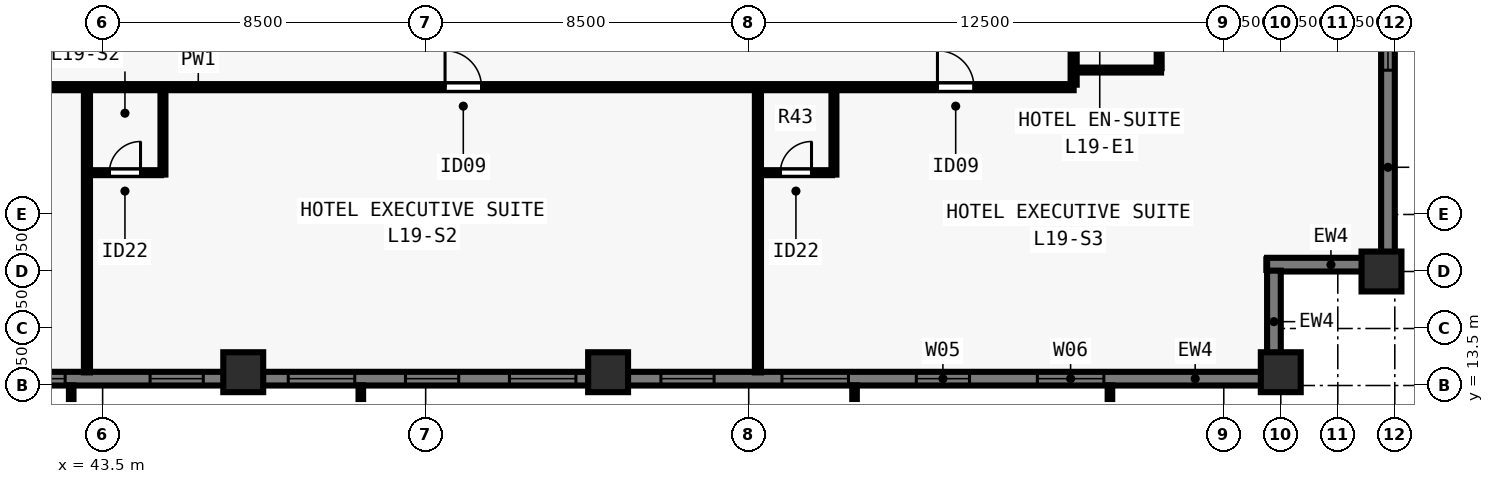
"""IFC4 building model, lengths in metres.
Left out: names, types, materials, properties, quantities, classifications, styles, units other than length and angle.
Written with IfcOpenShell. Run it as: python <this file> out.ifc"""

import sys

from ifc_helpers import new_model, si_unit, direction, frame, frame_2d, origin, origin_2d, place, context, subcontext, project, spatial, rectangle, extrude, element, fill, save


model = new_model("IFC4")
c1 = context("Model", 3, precision=1e-05, world=origin(), true_north=direction((0.0, 1.0)))
c2 = subcontext(c1, "Body", "Model", "MODEL_VIEW")
j1 = project(units=[si_unit("LENGTHUNIT", "METRE"), si_unit("PLANEANGLEUNIT", "RADIAN")], contexts=[c1])
p1 = place(None, origin())
s1 = spatial("IfcSite", under=j1, at=p1, CompositionType="ELEMENT")
p2 = place(p1, origin())
s2 = spatial("IfcBuilding", under=s1, at=p2, CompositionType="ELEMENT")
p3 = place(p2, frame((0.0, 0.0, 72.5)))
s3 = spatial("IfcBuildingStorey", under=s2, at=p3, CompositionType="ELEMENT", Elevation=72.5)
for number, where, z_axis, x_axis in (
    (1, (47.2, 13.85, 0.0), (0.0, 0.0, 1.0), (1.0, 0.0, 0.0)),
    (2, (56.8, 13.85, 0.0), (0.0, 0.0, 1.0), (1.0, 0.0, 0.0)),
    (3, (74.5, 13.85, 0.0), (0.0, 0.0, 1.0), (1.0, 0.0, 0.0)),
    (4, (77.15, 16.5, 0.0), (0.0, 0.0, 1.0), (0.0, 1.0, 0.0)),
):
    element("IfcColumn", number, at=place(p3, frame(where, z_axis=z_axis, x_axis=x_axis)), inside=s3, PredefinedType="COLUMN", context=c2, shape_type="SweptSolid", body=[
        extrude(rectangle(XDim=1.05, YDim=1.05, at=origin_2d()), origin(), (0.0, 0.0, 1.0), 3.5),
    ])
p4 = place(p3, frame((77.32, 36.4, 0.0), z_axis=(0.0, 0.0, 1.0), x_axis=(0.0, -1.0, 0.0)))
e5 = element("IfcWall", 5, at=p4, inside=s3, PredefinedType="SOLIDWALL", context=c2, shape_type="SweptSolid", body=[
    extrude(rectangle(XDim=19.562, YDim=0.36, at=frame_2d((9.781, 0.0))), origin(), (0.0, 0.0, 1.0), 3.28),
])
p5 = place(p4, frame((3.033, 0.0, 0.8)))
e6 = element("IfcOpeningElement", 6, at=p5, cuts=e5, PredefinedType="OPENING", context=c2, shape_type="SweptSolid", body=[
    extrude(rectangle(XDim=1.75, YDim=1.544, at=frame_2d((0.875, 0.772))), frame((0.0, 0.19, 0.0), z_axis=(0.0, -1.0, 0.0), x_axis=(1.0, 0.0, 0.0)), (0.0, 0.0, 1.0), 0.38),
])
p6 = place(p4, frame((5.973, 0.0, 0.8)))
e7 = element("IfcOpeningElement", 7, at=p6, cuts=e5, PredefinedType="OPENING", context=c2, shape_type="SweptSolid", body=[
    extrude(rectangle(XDim=1.4, YDim=1.544, at=frame_2d((0.7, 0.772))), frame((0.0, 0.19, 0.0), z_axis=(0.0, -1.0, 0.0), x_axis=(1.0, 0.0, 0.0)), (0.0, 0.0, 1.0), 0.38),
])
p7 = place(p4, frame((9.414, 0.0, 0.8)))
e8 = element("IfcOpeningElement", 8, at=p7, cuts=e5, PredefinedType="OPENING", context=c2, shape_type="SweptSolid", body=[
    extrude(rectangle(XDim=1.75, YDim=1.544, at=frame_2d((0.875, 0.772))), frame((0.0, 0.19, 0.0), z_axis=(0.0, -1.0, 0.0), x_axis=(1.0, 0.0, 0.0)), (0.0, 0.0, 1.0), 0.38),
])
p8 = place(p4, frame((13.204, 0.0, 0.8)))
e9 = element("IfcOpeningElement", 9, at=p8, cuts=e5, PredefinedType="OPENING", context=c2, shape_type="SweptSolid", body=[
    extrude(rectangle(XDim=1.4, YDim=1.544, at=frame_2d((0.7, 0.772))), frame((0.0, 0.19, 0.0), z_axis=(0.0, -1.0, 0.0), x_axis=(1.0, 0.0, 0.0)), (0.0, 0.0, 1.0), 0.38),
])
p9 = place(p3, frame((77.5, 16.68, 0.0), z_axis=(0.0, 0.0, 1.0), x_axis=(-1.0, 0.0, 0.0)))
e10 = element("IfcWall", 10, at=p9, inside=s3, PredefinedType="SOLIDWALL", context=c2, shape_type="SweptSolid", body=[
    extrude(rectangle(XDim=3.36, YDim=0.36, at=frame_2d((1.68, 0.0))), origin(), (0.0, 0.0, 1.0), 3.28),
])
p10 = place(p3, frame((74.32, 16.522, 0.0), z_axis=(0.0, 0.0, 1.0), x_axis=(0.0, -1.0, 0.0)))
e11 = element("IfcWall", 11, at=p10, inside=s3, PredefinedType="SOLIDWALL", context=c2, shape_type="SweptSolid", body=[
    extrude(rectangle(XDim=2.684, YDim=0.36, at=frame_2d((1.342, 0.0))), origin(), (0.0, 0.0, 1.0), 3.28),
])
p11 = place(p3, frame((74.5, 13.68, 0.0), z_axis=(0.0, 0.0, 1.0), x_axis=(-1.0, 0.0, 0.0)))
e12 = element("IfcWall", 12, at=p11, inside=s3, PredefinedType="SOLIDWALL", context=c2, shape_type="SweptSolid", body=[
    extrude(rectangle(XDim=44.662, YDim=0.36, at=frame_2d((22.331, 0.0))), origin(), (0.0, 0.0, 1.0), 3.28),
])
p12 = place(p11, frame((4.655, 0.0, 0.8)))
e13 = element("IfcOpeningElement", 13, at=p12, cuts=e12, PredefinedType="OPENING", context=c2, shape_type="SweptSolid", body=[
    extrude(rectangle(XDim=1.75, YDim=1.544, at=frame_2d((0.875, 0.772))), frame((0.0, 0.19, 0.0), z_axis=(0.0, -1.0, 0.0), x_axis=(1.0, 0.0, 0.0)), (0.0, 0.0, 1.0), 0.38),
])
p13 = place(p11, frame((8.19, 0.0, 0.8)))
e14 = element("IfcOpeningElement", 14, at=p13, cuts=e12, PredefinedType="OPENING", context=c2, shape_type="SweptSolid", body=[
    extrude(rectangle(XDim=1.4, YDim=1.544, at=frame_2d((0.7, 0.772))), frame((0.0, 0.19, 0.0), z_axis=(0.0, -1.0, 0.0), x_axis=(1.0, 0.0, 0.0)), (0.0, 0.0, 1.0), 0.38),
])
p14 = place(p11, frame((11.375, 0.0, 0.8)))
e15 = element("IfcOpeningElement", 15, at=p14, cuts=e12, PredefinedType="OPENING", context=c2, shape_type="SweptSolid", body=[
    extrude(rectangle(XDim=1.75, YDim=1.544, at=frame_2d((0.875, 0.772))), frame((0.0, 0.19, 0.0), z_axis=(0.0, -1.0, 0.0), x_axis=(1.0, 0.0, 0.0)), (0.0, 0.0, 1.0), 0.38),
])
p15 = place(p11, frame((14.911, 0.0, 0.8)))
e16 = element("IfcOpeningElement", 16, at=p15, cuts=e12, PredefinedType="OPENING", context=c2, shape_type="SweptSolid", body=[
    extrude(rectangle(XDim=1.4, YDim=1.544, at=frame_2d((0.7, 0.772))), frame((0.0, 0.19, 0.0), z_axis=(0.0, -1.0, 0.0), x_axis=(1.0, 0.0, 0.0)), (0.0, 0.0, 1.0), 0.38),
])
p16 = place(p11, frame((18.546, 0.0, 0.8)))
e17 = element("IfcOpeningElement", 17, at=p16, cuts=e12, PredefinedType="OPENING", context=c2, shape_type="SweptSolid", body=[
    extrude(rectangle(XDim=1.75, YDim=1.544, at=frame_2d((0.875, 0.772))), frame((0.0, 0.19, 0.0), z_axis=(0.0, -1.0, 0.0), x_axis=(1.0, 0.0, 0.0)), (0.0, 0.0, 1.0), 0.38),
])
p17 = place(p11, frame((21.631, 0.0, 0.8)))
e18 = element("IfcOpeningElement", 18, at=p17, cuts=e12, PredefinedType="OPENING", context=c2, shape_type="SweptSolid", body=[
    extrude(rectangle(XDim=1.4, YDim=1.544, at=frame_2d((0.7, 0.772))), frame((0.0, 0.19, 0.0), z_axis=(0.0, -1.0, 0.0), x_axis=(1.0, 0.0, 0.0)), (0.0, 0.0, 1.0), 0.38),
])
p18 = place(p11, frame((24.366, 0.0, 0.8)))
e19 = element("IfcOpeningElement", 19, at=p18, cuts=e12, PredefinedType="OPENING", context=c2, shape_type="SweptSolid", body=[
    extrude(rectangle(XDim=1.75, YDim=1.544, at=frame_2d((0.875, 0.772))), frame((0.0, 0.19, 0.0), z_axis=(0.0, -1.0, 0.0), x_axis=(1.0, 0.0, 0.0)), (0.0, 0.0, 1.0), 0.38),
])
p19 = place(p11, frame((28.351, 0.0, 0.8)))
e20 = element("IfcOpeningElement", 20, at=p19, cuts=e12, PredefinedType="OPENING", context=c2, shape_type="SweptSolid", body=[
    extrude(rectangle(XDim=1.4, YDim=1.544, at=frame_2d((0.7, 0.772))), frame((0.0, 0.19, 0.0), z_axis=(0.0, -1.0, 0.0), x_axis=(1.0, 0.0, 0.0)), (0.0, 0.0, 1.0), 0.38),
])
p20 = place(p11, frame((31.987, 0.0, 0.8)))
e21 = element("IfcOpeningElement", 21, at=p20, cuts=e12, PredefinedType="OPENING", context=c2, shape_type="SweptSolid", body=[
    extrude(rectangle(XDim=1.75, YDim=1.544, at=frame_2d((0.875, 0.772))), frame((0.0, 0.19, 0.0), z_axis=(0.0, -1.0, 0.0), x_axis=(1.0, 0.0, 0.0)), (0.0, 0.0, 1.0), 0.38),
])
p21 = place(p11, frame((35.072, 0.0, 0.8)))
e22 = element("IfcOpeningElement", 22, at=p21, cuts=e12, PredefinedType="OPENING", context=c2, shape_type="SweptSolid", body=[
    extrude(rectangle(XDim=1.4, YDim=1.544, at=frame_2d((0.7, 0.772))), frame((0.0, 0.19, 0.0), z_axis=(0.0, -1.0, 0.0), x_axis=(1.0, 0.0, 0.0)), (0.0, 0.0, 1.0), 0.38),
])
p22 = place(p11, frame((38.257, 0.0, 0.8)))
e23 = element("IfcOpeningElement", 23, at=p22, cuts=e12, PredefinedType="OPENING", context=c2, shape_type="SweptSolid", body=[
    extrude(rectangle(XDim=1.75, YDim=1.544, at=frame_2d((0.875, 0.772))), frame((0.0, 0.19, 0.0), z_axis=(0.0, -1.0, 0.0), x_axis=(1.0, 0.0, 0.0)), (0.0, 0.0, 1.0), 0.38),
])
p23 = place(p3, frame((34.95, 21.35, 0.0), z_axis=(0.0, 0.0, 1.0), x_axis=(1.0, 0.0, 0.0)))
e24 = element("IfcWall", 24, at=p23, inside=s3, PredefinedType="PARTITIONING", context=c2, shape_type="SweptSolid", body=[
    extrude(rectangle(XDim=34.1, YDim=0.16, at=frame_2d((17.05, 0.0))), origin(), (0.0, 0.0, 1.0), 3.28),
])
p24 = place(p23, frame((3.614, 0.0, 0.0)))
e25 = element("IfcOpeningElement", 25, at=p24, cuts=e24, PredefinedType="OPENING", context=c2, shape_type="SweptSolid", body=[
    extrude(rectangle(XDim=0.96, YDim=2.15, at=frame_2d((0.48, 1.075))), frame((0.0, 0.09, 0.0), z_axis=(0.0, -1.0, 0.0), x_axis=(1.0, 0.0, 0.0)), (0.0, 0.0, 1.0), 0.18),
])
p25 = place(p23, frame((17.56, 0.0, 0.0)))
e26 = element("IfcOpeningElement", 26, at=p25, cuts=e24, PredefinedType="OPENING", context=c2, shape_type="SweptSolid", body=[
    extrude(rectangle(XDim=0.96, YDim=2.15, at=frame_2d((0.48, 1.075))), frame((0.0, 0.09, 0.0), z_axis=(0.0, -1.0, 0.0), x_axis=(1.0, 0.0, 0.0)), (0.0, 0.0, 1.0), 0.18),
])
p26 = place(p23, frame((30.516, 0.0, 0.0)))
e27 = element("IfcOpeningElement", 27, at=p26, cuts=e24, PredefinedType="OPENING", context=c2, shape_type="SweptSolid", body=[
    extrude(rectangle(XDim=0.96, YDim=2.15, at=frame_2d((0.48, 1.075))), frame((0.0, 0.09, 0.0), z_axis=(0.0, -1.0, 0.0), x_axis=(1.0, 0.0, 0.0)), (0.0, 0.0, 1.0), 0.18),
])
p27 = place(p3, frame((69.05, 21.415, 0.0), z_axis=(0.0, 0.0, 1.0), x_axis=(0.0, 1.0, 0.0)))
e28 = element("IfcWall", 28, at=p27, inside=s3, PredefinedType="PARTITIONING", context=c2, shape_type="SweptSolid", body=[
    extrude(rectangle(XDim=35.17, YDim=0.16, at=frame_2d((17.585, 0.0))), origin(), (0.0, 0.0, 1.0), 3.28),
])
p28 = place(p27, frame((9.746, 0.0, 0.0)))
e29 = element("IfcOpeningElement", 29, at=p28, cuts=e28, PredefinedType="OPENING", context=c2, shape_type="SweptSolid", body=[
    extrude(rectangle(XDim=0.96, YDim=2.15, at=frame_2d((0.48, 1.075))), frame((0.0, 0.09, 0.0), z_axis=(0.0, -1.0, 0.0), x_axis=(1.0, 0.0, 0.0)), (0.0, 0.0, 1.0), 0.18),
])
p29 = place(p27, frame((27.146, 0.0, 0.0)))
e30 = element("IfcOpeningElement", 30, at=p29, cuts=e28, PredefinedType="OPENING", context=c2, shape_type="SweptSolid", body=[
    extrude(rectangle(XDim=0.96, YDim=2.15, at=frame_2d((0.48, 1.075))), frame((0.0, 0.09, 0.0), z_axis=(0.0, -1.0, 0.0), x_axis=(1.0, 0.0, 0.0)), (0.0, 0.0, 1.0), 0.18),
])
p30 = place(p3, frame((43.087, 13.845, 0.0), z_axis=(0.0, 0.0, 1.0), x_axis=(0.0, 1.0, 0.0)))
e31 = element("IfcWall", 31, at=p30, inside=s3, PredefinedType="PARTITIONING", context=c2, shape_type="SweptSolid", body=[
    extrude(rectangle(XDim=7.44, YDim=0.16, at=frame_2d((3.72, 0.0))), origin(), (0.0, 0.0, 1.0), 3.28),
])
p31 = place(p3, frame((45.087, 19.05, 0.0), z_axis=(0.0, 0.0, 1.0), x_axis=(0.0, 1.0, 0.0)))
e32 = element("IfcWall", 32, at=p31, inside=s3, PredefinedType="PLUMBINGWALL", context=c2, shape_type="SweptSolid", body=[
    extrude(rectangle(XDim=2.235, YDim=0.13, at=frame_2d((1.117, 0.0))), origin(), (0.0, 0.0, 1.0), 3.28),
])
p32 = place(p3, frame((43.153, 19.1, 0.0), z_axis=(0.0, 0.0, 1.0), x_axis=(1.0, 0.0, 0.0)))
e33 = element("IfcWall", 33, at=p32, inside=s3, PredefinedType="PLUMBINGWALL", context=c2, shape_type="SweptSolid", body=[
    extrude(rectangle(XDim=1.885, YDim=0.13, at=frame_2d((0.942, 0.0))), origin(), (0.0, 0.0, 1.0), 3.28),
])
p33 = place(p32, frame((0.525, 0.0, 0.0)))
e34 = element("IfcOpeningElement", 34, at=p33, cuts=e33, PredefinedType="OPENING", context=c2, shape_type="SweptSolid", body=[
    extrude(rectangle(XDim=0.82, YDim=2.1, at=frame_2d((0.41, 1.05))), frame((0.0, 0.075, 0.0), z_axis=(0.0, -1.0, 0.0), x_axis=(1.0, 0.0, 0.0)), (0.0, 0.0, 1.0), 0.15),
])
p34 = place(p3, frame((60.742, 13.845, 0.0), z_axis=(0.0, 0.0, 1.0), x_axis=(0.0, 1.0, 0.0)))
e35 = element("IfcWall", 35, at=p34, inside=s3, PredefinedType="PARTITIONING", context=c2, shape_type="SweptSolid", body=[
    extrude(rectangle(XDim=7.44, YDim=0.16, at=frame_2d((3.72, 0.0))), origin(), (0.0, 0.0, 1.0), 3.28),
])
p35 = place(p3, frame((62.742, 19.05, 0.0), z_axis=(0.0, 0.0, 1.0), x_axis=(0.0, 1.0, 0.0)))
e36 = element("IfcWall", 36, at=p35, inside=s3, PredefinedType="PLUMBINGWALL", context=c2, shape_type="SweptSolid", body=[
    extrude(rectangle(XDim=2.235, YDim=0.13, at=frame_2d((1.117, 0.0))), origin(), (0.0, 0.0, 1.0), 3.28),
])
p36 = place(p3, frame((60.808, 19.1, 0.0), z_axis=(0.0, 0.0, 1.0), x_axis=(1.0, 0.0, 0.0)))
e37 = element("IfcWall", 37, at=p36, inside=s3, PredefinedType="PLUMBINGWALL", context=c2, shape_type="SweptSolid", body=[
    extrude(rectangle(XDim=1.885, YDim=0.13, at=frame_2d((0.942, 0.0))), origin(), (0.0, 0.0, 1.0), 3.28),
])
p37 = place(p36, frame((0.525, 0.0, 0.0)))
e38 = element("IfcOpeningElement", 38, at=p37, cuts=e37, PredefinedType="OPENING", context=c2, shape_type="SweptSolid", body=[
    extrude(rectangle(XDim=0.82, YDim=2.1, at=frame_2d((0.41, 1.05))), frame((0.0, 0.075, 0.0), z_axis=(0.0, -1.0, 0.0), x_axis=(1.0, 0.0, 0.0)), (0.0, 0.0, 1.0), 0.15),
])
p38 = place(p3, frame((69.115, 21.8, 0.0), z_axis=(0.0, 0.0, 1.0), x_axis=(1.0, 0.0, 0.0)))
e39 = element("IfcWall", 39, at=p38, inside=s3, PredefinedType="PLUMBINGWALL", context=c2, shape_type="SweptSolid", body=[
    extrude(rectangle(XDim=2.235, YDim=0.13, at=frame_2d((1.118, 0.0))), origin(), (0.0, 0.0, 1.0), 2.849),
])
p39 = place(p3, frame((71.3, 21.85, 0.0), z_axis=(0.0, 0.0, 1.0), x_axis=(0.0, 1.0, 0.0)))
e40 = element("IfcWall", 40, at=p39, inside=s3, PredefinedType="PLUMBINGWALL", context=c2, shape_type="SweptSolid", body=[
    extrude(rectangle(XDim=1.9, YDim=0.13, at=frame_2d((0.95, 0.0))), origin(), (0.0, 0.0, 1.0), 3.28),
])
p40 = place(p39, frame((0.54, 0.0, 0.0)))
e41 = element("IfcOpeningElement", 41, at=p40, cuts=e40, PredefinedType="OPENING", context=c2, shape_type="SweptSolid", body=[
    extrude(rectangle(XDim=0.82, YDim=2.1, at=frame_2d((0.41, 1.05))), frame((0.0, 0.075, 0.0), z_axis=(0.0, -1.0, 0.0), x_axis=(1.0, 0.0, 0.0)), (0.0, 0.0, 1.0), 0.15),
])
p41 = place(p8, origin())
e42 = element("IfcWindow", 42, at=p41, inside=s3, PartitioningType="SINGLE_PANEL", PredefinedType="WINDOW", context=c2, shape_type="SweptSolid", body=[
    extrude(rectangle(XDim=1.4, YDim=1.544, at=frame_2d((0.7, 0.772))), frame((0.0, -0.05, 0.0), z_axis=(0.0, -1.0, 0.0), x_axis=(1.0, 0.0, 0.0)), (0.0, 0.0, 1.0), 0.06),
])
fill(e9, e42)
p42 = place(p12, origin())
e43 = element("IfcWindow", 43, at=p42, inside=s3, PartitioningType="SINGLE_PANEL", PredefinedType="WINDOW", context=c2, shape_type="SweptSolid", body=[
    extrude(rectangle(XDim=1.75, YDim=1.544, at=frame_2d((0.875, 0.772))), frame((0.0, -0.05, 0.0), z_axis=(0.0, -1.0, 0.0), x_axis=(1.0, 0.0, 0.0)), (0.0, 0.0, 1.0), 0.06),
])
fill(e13, e43)
p43 = place(p13, origin())
e44 = element("IfcWindow", 44, at=p43, inside=s3, PartitioningType="SINGLE_PANEL", PredefinedType="WINDOW", context=c2, shape_type="SweptSolid", body=[
    extrude(rectangle(XDim=1.4, YDim=1.544, at=frame_2d((0.7, 0.772))), frame((0.0, -0.05, 0.0), z_axis=(0.0, -1.0, 0.0), x_axis=(1.0, 0.0, 0.0)), (0.0, 0.0, 1.0), 0.06),
])
fill(e14, e44)
p44 = place(p14, origin())
e45 = element("IfcWindow", 45, at=p44, inside=s3, PartitioningType="SINGLE_PANEL", PredefinedType="WINDOW", context=c2, shape_type="SweptSolid", body=[
    extrude(rectangle(XDim=1.75, YDim=1.544, at=frame_2d((0.875, 0.772))), frame((0.0, -0.05, 0.0), z_axis=(0.0, -1.0, 0.0), x_axis=(1.0, 0.0, 0.0)), (0.0, 0.0, 1.0), 0.06),
])
fill(e15, e45)
p45 = place(p15, origin())
e46 = element("IfcWindow", 46, at=p45, inside=s3, PartitioningType="SINGLE_PANEL", PredefinedType="WINDOW", context=c2, shape_type="SweptSolid", body=[
    extrude(rectangle(XDim=1.4, YDim=1.544, at=frame_2d((0.7, 0.772))), frame((0.0, -0.05, 0.0), z_axis=(0.0, -1.0, 0.0), x_axis=(1.0, 0.0, 0.0)), (0.0, 0.0, 1.0), 0.06),
])
fill(e16, e46)
p46 = place(p16, origin())
e47 = element("IfcWindow", 47, at=p46, inside=s3, PartitioningType="SINGLE_PANEL", PredefinedType="WINDOW", context=c2, shape_type="SweptSolid", body=[
    extrude(rectangle(XDim=1.75, YDim=1.544, at=frame_2d((0.875, 0.772))), frame((0.0, -0.05, 0.0), z_axis=(0.0, -1.0, 0.0), x_axis=(1.0, 0.0, 0.0)), (0.0, 0.0, 1.0), 0.06),
])
fill(e17, e47)
p47 = place(p17, origin())
e48 = element("IfcWindow", 48, at=p47, inside=s3, PartitioningType="SINGLE_PANEL", PredefinedType="WINDOW", context=c2, shape_type="SweptSolid", body=[
    extrude(rectangle(XDim=1.4, YDim=1.544, at=frame_2d((0.7, 0.772))), frame((0.0, -0.05, 0.0), z_axis=(0.0, -1.0, 0.0), x_axis=(1.0, 0.0, 0.0)), (0.0, 0.0, 1.0), 0.06),
])
fill(e18, e48)
p48 = place(p18, origin())
e49 = element("IfcWindow", 49, at=p48, inside=s3, PartitioningType="SINGLE_PANEL", PredefinedType="WINDOW", context=c2, shape_type="SweptSolid", body=[
    extrude(rectangle(XDim=1.75, YDim=1.544, at=frame_2d((0.875, 0.772))), frame((0.0, -0.05, 0.0), z_axis=(0.0, -1.0, 0.0), x_axis=(1.0, 0.0, 0.0)), (0.0, 0.0, 1.0), 0.06),
])
fill(e19, e49)
p49 = place(p19, origin())
e50 = element("IfcWindow", 50, at=p49, inside=s3, PartitioningType="SINGLE_PANEL", PredefinedType="WINDOW", context=c2, shape_type="SweptSolid", body=[
    extrude(rectangle(XDim=1.4, YDim=1.544, at=frame_2d((0.7, 0.772))), frame((0.0, -0.05, 0.0), z_axis=(0.0, -1.0, 0.0), x_axis=(1.0, 0.0, 0.0)), (0.0, 0.0, 1.0), 0.06),
])
fill(e20, e50)
p50 = place(p20, origin())
e51 = element("IfcWindow", 51, at=p50, inside=s3, PartitioningType="SINGLE_PANEL", PredefinedType="WINDOW", context=c2, shape_type="SweptSolid", body=[
    extrude(rectangle(XDim=1.75, YDim=1.544, at=frame_2d((0.875, 0.772))), frame((0.0, -0.05, 0.0), z_axis=(0.0, -1.0, 0.0), x_axis=(1.0, 0.0, 0.0)), (0.0, 0.0, 1.0), 0.06),
])
fill(e21, e51)
p51 = place(p33, origin())
e52 = element("IfcDoor", 52, at=p51, inside=s3, OperationType="SINGLE_SWING_RIGHT", PredefinedType="DOOR", context=c2, shape_type="SweptSolid", body=[
    extrude(rectangle(XDim=0.82, YDim=2.1, at=frame_2d((0.41, 1.05))), frame((0.0, 0.025, 0.0), z_axis=(0.0, -1.0, 0.0), x_axis=(1.0, 0.0, 0.0)), (0.0, 0.0, 1.0), 0.05),
])
fill(e34, e52)
p52 = place(p25, origin())
e53 = element("IfcDoor", 53, at=p52, inside=s3, OperationType="SINGLE_SWING_LEFT", PredefinedType="DOOR", context=c2, shape_type="SweptSolid", body=[
    extrude(rectangle(XDim=0.96, YDim=2.15, at=frame_2d((0.48, 1.075))), frame((0.0, 0.025, 0.0), z_axis=(0.0, -1.0, 0.0), x_axis=(1.0, 0.0, 0.0)), (0.0, 0.0, 1.0), 0.05),
])
fill(e26, e53)
p53 = place(p37, origin())
e54 = element("IfcDoor", 54, at=p53, inside=s3, OperationType="SINGLE_SWING_RIGHT", PredefinedType="DOOR", context=c2, shape_type="SweptSolid", body=[
    extrude(rectangle(XDim=0.82, YDim=2.1, at=frame_2d((0.41, 1.05))), frame((0.0, 0.025, 0.0), z_axis=(0.0, -1.0, 0.0), x_axis=(1.0, 0.0, 0.0)), (0.0, 0.0, 1.0), 0.05),
])
fill(e38, e54)
p54 = place(p26, origin())
e55 = element("IfcDoor", 55, at=p54, inside=s3, OperationType="SINGLE_SWING_LEFT", PredefinedType="DOOR", context=c2, shape_type="SweptSolid", body=[
    extrude(rectangle(XDim=0.96, YDim=2.15, at=frame_2d((0.48, 1.075))), frame((0.0, 0.025, 0.0), z_axis=(0.0, -1.0, 0.0), x_axis=(1.0, 0.0, 0.0)), (0.0, 0.0, 1.0), 0.05),
])
fill(e27, e55)
save(model, sys.argv[1])
